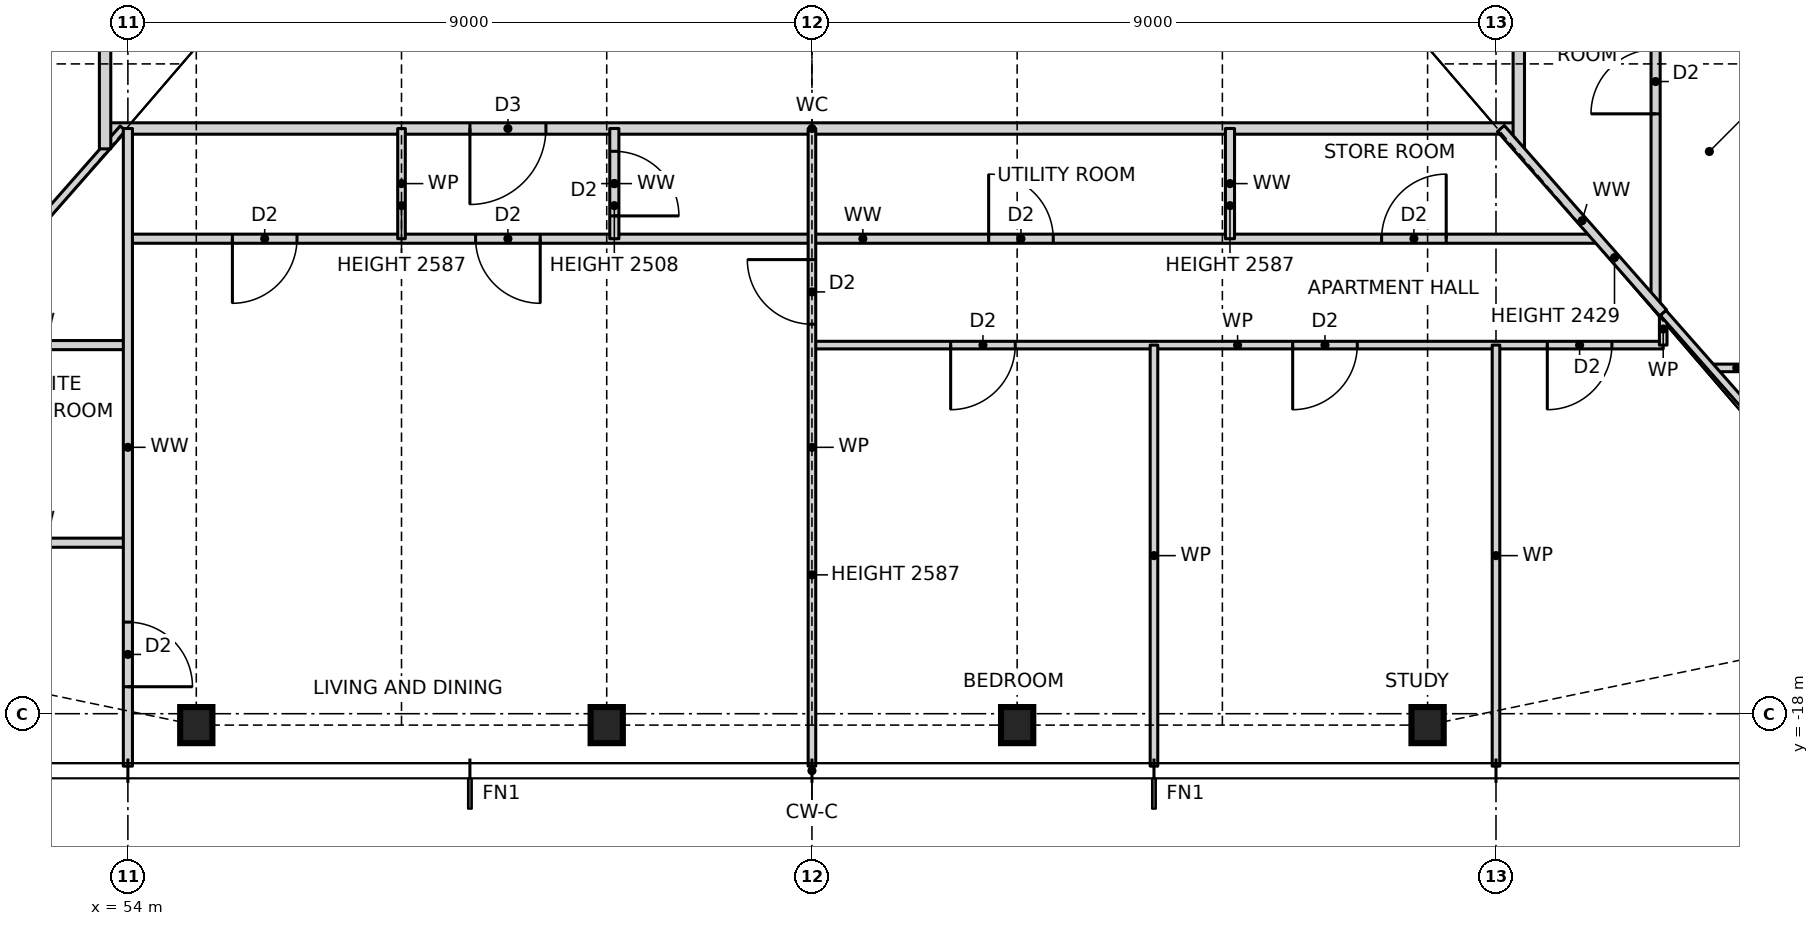
"""IFC4 building model, lengths in metres.
Left out: names, types, materials, properties, quantities, classifications, styles, units other than length and angle.
Written with IfcOpenShell. Run it as: python <this file> out.ifc"""

import sys

from ifc_helpers import new_model, si_unit, direction, frame, frame_2d, origin, origin_2d, place, context, subcontext, project, spatial, rectangle, i_section, extrude, element, fill, save


model = new_model("IFC4")
c1 = context("Model", 3, precision=1e-05, world=origin(), true_north=direction((0.0, 1.0)))
c2 = subcontext(c1, "Body", "Model", "MODEL_VIEW")
j1 = project(units=[si_unit("LENGTHUNIT", "METRE"), si_unit("PLANEANGLEUNIT", "RADIAN")], contexts=[c1])
p1 = place(None, origin())
s1 = spatial("IfcSite", under=j1, at=p1, CompositionType="ELEMENT")
p2 = place(p1, origin())
s2 = spatial("IfcBuilding", under=s1, at=p2, CompositionType="ELEMENT")
p3 = place(p2, frame((0.0, 0.0, 25.5)))
s3 = spatial("IfcBuildingStorey", under=s2, at=p3, CompositionType="ELEMENT", Elevation=25.5)
for number, where, z_axis, x_axis in (
    (1, (54.9, -18.15, 0.0), (0.0, 0.0, 1.0), (1.0, 0.0, 0.0)),
    (2, (60.3, -18.15, 0.0), (0.0, 0.0, 1.0), (1.0, 0.0, 0.0)),
    (3, (65.7, -18.15, 0.0), (0.0, 0.0, 1.0), (1.0, 0.0, 0.0)),
    (4, (71.1, -18.15, 0.0), (0.0, 0.0, 1.0), (1.0, 0.0, 0.0)),
):
    element("IfcColumn", number, at=place(p3, frame(where, z_axis=z_axis, x_axis=x_axis)), inside=s3, PredefinedType="COLUMN", context=c2, shape_type="SweptSolid", body=[
        extrude(i_section(OverallWidth=0.424, OverallDepth=0.475, WebThickness=0.048, FlangeThickness=0.077, at=origin_2d()), origin(), (0.0, 0.0, 1.0), 3.5),
    ])
p4 = place(p3, frame((51.6, -15.75, 0.0), z_axis=(0.0, 0.0, 1.0), x_axis=(1.0, 0.0, 0.0)))
e5 = element("IfcWall", 5, at=p4, inside=s3, PredefinedType="PARTITIONING", context=c2, shape_type="SweptSolid", body=[
    extrude(rectangle(XDim=2.4, YDim=0.12, at=frame_2d((1.2, 0.0))), origin(), (0.0, 0.0, 1.0), 3.27),
])
p5 = place(p3, frame((74.836, -13.45, 0.0), z_axis=(0.0, 0.0, 1.0), x_axis=(1.0, 0.0, 0.0)))
e6 = element("IfcWall", 6, at=p5, inside=s3, PredefinedType="PARTITIONING", context=c2, shape_type="SweptSolid", body=[
    extrude(rectangle(XDim=0.664, YDim=0.1, at=frame_2d((0.332, 0.0))), origin(), (0.0, 0.0, 1.0), 3.27),
])
p6 = place(p3, frame((51.6, -13.15, 0.0), z_axis=(0.0, 0.0, 1.0), x_axis=(1.0, 0.0, 0.0)))
e7 = element("IfcWall", 7, at=p6, inside=s3, PredefinedType="PARTITIONING", context=c2, shape_type="SweptSolid", body=[
    extrude(rectangle(XDim=2.4, YDim=0.12, at=frame_2d((1.2, 0.0))), origin(), (0.0, 0.0, 1.0), 3.27),
])
p7 = place(p3, frame((63.0, -13.15, 0.0), z_axis=(0.0, 0.0, 1.0), x_axis=(1.0, 0.0, 0.0)))
e8 = element("IfcWall", 8, at=p7, inside=s3, PredefinedType="PARTITIONING", context=c2, shape_type="SweptSolid", body=[
    extrude(rectangle(XDim=11.2, YDim=0.1, at=frame_2d((5.6, 0.0))), origin(), (0.0, 0.0, 1.0), 3.27),
])
p8 = place(p7, frame((1.825, 0.0, 0.0)))
e9 = element("IfcOpeningElement", 9, at=p8, cuts=e8, PredefinedType="OPENING", context=c2, shape_type="SweptSolid", body=[
    extrude(rectangle(XDim=0.85, YDim=2.1, at=frame_2d((0.425, 1.05))), frame((0.0, 0.06, 0.0), z_axis=(0.0, -1.0, 0.0), x_axis=(1.0, 0.0, 0.0)), (0.0, 0.0, 1.0), 0.12),
])
p9 = place(p7, frame((6.325, 0.0, 0.0)))
e10 = element("IfcOpeningElement", 10, at=p9, cuts=e8, PredefinedType="OPENING", context=c2, shape_type="SweptSolid", body=[
    extrude(rectangle(XDim=0.85, YDim=2.1, at=frame_2d((0.425, 1.05))), frame((0.0, 0.06, 0.0), z_axis=(0.0, -1.0, 0.0), x_axis=(1.0, 0.0, 0.0)), (0.0, 0.0, 1.0), 0.12),
])
p10 = place(p7, frame((9.675, 0.0, 0.0)))
e11 = element("IfcOpeningElement", 11, at=p10, cuts=e8, PredefinedType="OPENING", context=c2, shape_type="SweptSolid", body=[
    extrude(rectangle(XDim=0.85, YDim=2.1, at=frame_2d((0.425, 1.05))), frame((0.0, 0.06, 0.0), z_axis=(0.0, -1.0, 0.0), x_axis=(1.0, 0.0, 0.0)), (0.0, 0.0, 1.0), 0.12),
])
p11 = place(p3, frame((54.0, -11.75, 0.0), z_axis=(0.0, 0.0, 1.0), x_axis=(1.0, 0.0, 0.0)))
e12 = element("IfcWall", 12, at=p11, inside=s3, PredefinedType="PARTITIONING", context=c2, shape_type="SweptSolid", body=[
    extrude(rectangle(XDim=19.34, YDim=0.12, at=frame_2d((9.67, 0.0))), origin(), (0.0, 0.0, 1.0), 3.27),
])
p12 = place(p11, frame((1.375, 0.0, 0.0)))
e13 = element("IfcOpeningElement", 13, at=p12, cuts=e12, PredefinedType="OPENING", context=c2, shape_type="SweptSolid", body=[
    extrude(rectangle(XDim=0.85, YDim=2.1, at=frame_2d((0.425, 1.05))), frame((0.0, 0.07, 0.0), z_axis=(0.0, -1.0, 0.0), x_axis=(1.0, 0.0, 0.0)), (0.0, 0.0, 1.0), 0.14),
])
p13 = place(p11, frame((4.575, 0.0, 0.0)))
e14 = element("IfcOpeningElement", 14, at=p13, cuts=e12, PredefinedType="OPENING", context=c2, shape_type="SweptSolid", body=[
    extrude(rectangle(XDim=0.85, YDim=2.1, at=frame_2d((0.425, 1.05))), frame((0.0, 0.07, 0.0), z_axis=(0.0, -1.0, 0.0), x_axis=(1.0, 0.0, 0.0)), (0.0, 0.0, 1.0), 0.14),
])
p14 = place(p11, frame((11.325, 0.0, 0.0)))
e15 = element("IfcOpeningElement", 15, at=p14, cuts=e12, PredefinedType="OPENING", context=c2, shape_type="SweptSolid", body=[
    extrude(rectangle(XDim=0.85, YDim=2.1, at=frame_2d((0.425, 1.05))), frame((0.0, 0.07, 0.0), z_axis=(0.0, -1.0, 0.0), x_axis=(1.0, 0.0, 0.0)), (0.0, 0.0, 1.0), 0.14),
])
p15 = place(p11, frame((16.495, 0.0, 0.0)))
e16 = element("IfcOpeningElement", 16, at=p15, cuts=e12, PredefinedType="OPENING", context=c2, shape_type="SweptSolid", body=[
    extrude(rectangle(XDim=0.85, YDim=2.1, at=frame_2d((0.425, 1.05))), frame((0.0, 0.07, 0.0), z_axis=(0.0, -1.0, 0.0), x_axis=(1.0, 0.0, 0.0)), (0.0, 0.0, 1.0), 0.14),
])
p16 = place(p3, frame((53.7, -10.3, 0.0), z_axis=(0.0, 0.0, 1.0), x_axis=(1.0, 0.0, 0.0)))
e17 = element("IfcWall", 17, at=p16, inside=s3, PredefinedType="PARTITIONING", context=c2, shape_type="SweptSolid", body=[
    extrude(rectangle(XDim=18.6, YDim=0.15, at=frame_2d((9.3, 0.0))), origin(), (0.0, 0.0, 1.0), 3.27),
])
p17 = place(p16, frame((4.8, 0.0, 0.0)))
e18 = element("IfcOpeningElement", 18, at=p17, cuts=e17, PredefinedType="OPENING", context=c2, shape_type="SweptSolid", body=[
    extrude(rectangle(XDim=1.0, YDim=2.1, at=frame_2d((0.5, 1.05))), frame((0.0, 0.085, 0.0), z_axis=(0.0, -1.0, 0.0), x_axis=(1.0, 0.0, 0.0)), (0.0, 0.0, 1.0), 0.17),
])
p18 = place(p3, frame((47.944, -17.109, 0.0), z_axis=(0.0, 0.0, 1.0), x_axis=(0.660638210404, 0.750704439146, 0.0)))
e19 = element("IfcWall", 19, at=p18, inside=s3, PredefinedType="PARTITIONING", context=c2, shape_type="SweptSolid", body=[
    extrude(rectangle(XDim=9.07, YDim=0.1, at=frame_2d((4.535, 0.0))), origin(), (0.0, 0.0, 1.0), 2.429),
])
p19 = place(p3, frame((74.2, -13.15, 0.0), z_axis=(0.0, 0.0, 1.0), x_axis=(0.0, 1.0, 0.0)))
e20 = element("IfcWall", 20, at=p19, inside=s3, PredefinedType="PARTITIONING", context=c2, shape_type="SweptSolid", body=[
    extrude(rectangle(XDim=0.423, YDim=0.1, at=frame_2d((0.211, 0.0))), origin(), (0.0, 0.0, 1.0), 3.27),
])
p20 = place(p3, frame((74.1, -12.614, 0.0), z_axis=(0.0, 0.0, 1.0), x_axis=(0.0, 1.0, 0.0)))
e21 = element("IfcWall", 21, at=p20, inside=s3, PredefinedType="PARTITIONING", context=c2, shape_type="SweptSolid", body=[
    extrude(rectangle(XDim=25.228, YDim=0.12, at=frame_2d((12.614, 0.0))), origin(), (0.0, 0.0, 1.0), 3.27),
])
p21 = place(p20, frame((7.239, 0.0, 0.0)))
e22 = element("IfcOpeningElement", 22, at=p21, cuts=e21, PredefinedType="OPENING", context=c2, shape_type="SweptSolid", body=[
    extrude(rectangle(XDim=0.85, YDim=2.1, at=frame_2d((0.425, 1.05))), frame((0.0, 0.07, 0.0), z_axis=(0.0, -1.0, 0.0), x_axis=(1.0, 0.0, 0.0)), (0.0, 0.0, 1.0), 0.14),
])
p22 = place(p20, frame((10.439, 0.0, 0.0)))
e23 = element("IfcOpeningElement", 23, at=p22, cuts=e21, PredefinedType="OPENING", context=c2, shape_type="SweptSolid", body=[
    extrude(rectangle(XDim=0.85, YDim=2.1, at=frame_2d((0.425, 1.05))), frame((0.0, 0.07, 0.0), z_axis=(0.0, -1.0, 0.0), x_axis=(1.0, 0.0, 0.0)), (0.0, 0.0, 1.0), 0.14),
])
p23 = place(p20, frame((2.507, 0.0, 0.0)))
e24 = element("IfcOpeningElement", 24, at=p23, cuts=e21, PredefinedType="OPENING", context=c2, shape_type="SweptSolid", body=[
    extrude(rectangle(XDim=0.85, YDim=2.1, at=frame_2d((0.425, 1.05))), frame((0.0, 0.07, 0.0), z_axis=(0.0, -1.0, 0.0), x_axis=(1.0, 0.0, 0.0)), (0.0, 0.0, 1.0), 0.14),
])
p24 = place(p20, frame((16.639, 0.0, 0.0)))
e25 = element("IfcOpeningElement", 25, at=p24, cuts=e21, PredefinedType="OPENING", context=c2, shape_type="SweptSolid", body=[
    extrude(rectangle(XDim=0.85, YDim=2.1, at=frame_2d((0.425, 1.05))), frame((0.0, 0.07, 0.0), z_axis=(0.0, -1.0, 0.0), x_axis=(1.0, 0.0, 0.0)), (0.0, 0.0, 1.0), 0.14),
])
p25 = place(p20, frame((21.821, 0.0, 0.0)))
e26 = element("IfcOpeningElement", 26, at=p25, cuts=e21, PredefinedType="OPENING", context=c2, shape_type="SweptSolid", body=[
    extrude(rectangle(XDim=0.85, YDim=2.1, at=frame_2d((0.425, 1.05))), frame((0.0, 0.07, 0.0), z_axis=(0.0, -1.0, 0.0), x_axis=(1.0, 0.0, 0.0)), (0.0, 0.0, 1.0), 0.14),
])
p26 = place(p3, frame((72.3, -10.568, 0.0), z_axis=(0.0, 0.0, 1.0), x_axis=(0.0, 1.0, 0.0)))
e27 = element("IfcWall", 27, at=p26, inside=s3, PredefinedType="PARTITIONING", context=c2, shape_type="SweptSolid", body=[
    extrude(rectangle(XDim=21.136, YDim=0.15, at=frame_2d((10.568, 0.0))), origin(), (0.0, 0.0, 1.0), 3.27),
])
p27 = place(p26, frame((8.318, 0.0, 0.0)))
e28 = element("IfcOpeningElement", 28, at=p27, cuts=e27, PredefinedType="OPENING", context=c2, shape_type="SweptSolid", body=[
    extrude(rectangle(XDim=1.0, YDim=2.1, at=frame_2d((0.5, 1.05))), frame((0.0, 0.085, 0.0), z_axis=(0.0, -1.0, 0.0), x_axis=(1.0, 0.0, 0.0)), (0.0, 0.0, 1.0), 0.17),
])
p28 = place(p3, frame((72.0, -18.69, 0.0), z_axis=(0.0, 0.0, 1.0), x_axis=(0.0, 1.0, 0.0)))
e29 = element("IfcWall", 29, at=p28, inside=s3, PredefinedType="PARTITIONING", context=c2, shape_type="SweptSolid", body=[
    extrude(rectangle(XDim=5.54, YDim=0.1, at=frame_2d((2.77, 0.0))), origin(), (0.0, 0.0, 1.0), 3.27),
])
p29 = place(p3, frame((68.5, -11.75, 0.0), z_axis=(0.0, 0.0, 1.0), x_axis=(0.0, 1.0, 0.0)))
e30 = element("IfcWall", 30, at=p29, inside=s3, PredefinedType="PARTITIONING", context=c2, shape_type="SweptSolid", body=[
    extrude(rectangle(XDim=1.45, YDim=0.12, at=frame_2d((0.725, 0.0))), origin(), (0.0, 0.0, 1.0), 2.587),
])
p30 = place(p3, frame((67.5, -18.69, 0.0), z_axis=(0.0, 0.0, 1.0), x_axis=(0.0, 1.0, 0.0)))
e31 = element("IfcWall", 31, at=p30, inside=s3, PredefinedType="PARTITIONING", context=c2, shape_type="SweptSolid", body=[
    extrude(rectangle(XDim=5.54, YDim=0.1, at=frame_2d((2.77, 0.0))), origin(), (0.0, 0.0, 1.0), 3.27),
])
p31 = place(p3, frame((63.0, -18.69, 0.0), z_axis=(0.0, 0.0, 1.0), x_axis=(0.0, 1.0, 0.0)))
e32 = element("IfcWall", 32, at=p31, inside=s3, PredefinedType="PARTITIONING", context=c2, shape_type="SweptSolid", body=[
    extrude(rectangle(XDim=8.39, YDim=0.1, at=frame_2d((4.195, 0.0))), origin(), (0.0, 0.0, 1.0), 2.587),
])
p32 = place(p31, frame((5.815, 0.0, 0.0)))
e33 = element("IfcOpeningElement", 33, at=p32, cuts=e32, PredefinedType="OPENING", context=c2, shape_type="SweptSolid", body=[
    extrude(rectangle(XDim=0.85, YDim=2.1, at=frame_2d((0.425, 1.05))), frame((0.0, 0.06, 0.0), z_axis=(0.0, -1.0, 0.0), x_axis=(1.0, 0.0, 0.0)), (0.0, 0.0, 1.0), 0.12),
])
p33 = place(p3, frame((60.4, -11.75, 0.0), z_axis=(0.0, 0.0, 1.0), x_axis=(0.0, 1.0, 0.0)))
e34 = element("IfcWall", 34, at=p33, inside=s3, PredefinedType="PARTITIONING", context=c2, shape_type="SweptSolid", body=[
    extrude(rectangle(XDim=1.45, YDim=0.12, at=frame_2d((0.725, 0.0))), origin(), (0.0, 0.0, 1.0), 2.508),
])
p34 = place(p33, frame((0.3, 0.0, 0.0)))
e35 = element("IfcOpeningElement", 35, at=p34, cuts=e34, PredefinedType="OPENING", context=c2, shape_type="SweptSolid", body=[
    extrude(rectangle(XDim=0.85, YDim=2.1, at=frame_2d((0.425, 1.05))), frame((0.0, 0.07, 0.0), z_axis=(0.0, -1.0, 0.0), x_axis=(1.0, 0.0, 0.0)), (0.0, 0.0, 1.0), 0.14),
])
p35 = place(p3, frame((57.6, -11.75, 0.0), z_axis=(0.0, 0.0, 1.0), x_axis=(0.0, 1.0, 0.0)))
e36 = element("IfcWall", 36, at=p35, inside=s3, PredefinedType="PARTITIONING", context=c2, shape_type="SweptSolid", body=[
    extrude(rectangle(XDim=1.45, YDim=0.1, at=frame_2d((0.725, 0.0))), origin(), (0.0, 0.0, 1.0), 2.587),
])
p36 = place(p3, frame((54.0, -18.69, 0.0), z_axis=(0.0, 0.0, 1.0), x_axis=(0.0, 1.0, 0.0)))
e37 = element("IfcWall", 37, at=p36, inside=s3, PredefinedType="PARTITIONING", context=c2, shape_type="SweptSolid", body=[
    extrude(rectangle(XDim=8.39, YDim=0.12, at=frame_2d((4.195, 0.0))), origin(), (0.0, 0.0, 1.0), 3.27),
])
p37 = place(p36, frame((1.045, 0.0, 0.0)))
e38 = element("IfcOpeningElement", 38, at=p37, cuts=e37, PredefinedType="OPENING", context=c2, shape_type="SweptSolid", body=[
    extrude(rectangle(XDim=0.85, YDim=2.1, at=frame_2d((0.425, 1.05))), frame((0.0, 0.07, 0.0), z_axis=(0.0, -1.0, 0.0), x_axis=(1.0, 0.0, 0.0)), (0.0, 0.0, 1.0), 0.14),
])
p38 = place(p3, frame((53.7, -10.568, 0.0), z_axis=(0.0, 0.0, 1.0), x_axis=(0.0, 1.0, 0.0)))
e39 = element("IfcWall", 39, at=p38, inside=s3, PredefinedType="PARTITIONING", context=c2, shape_type="SweptSolid", body=[
    extrude(rectangle(XDim=21.136, YDim=0.15, at=frame_2d((10.568, 0.0))), origin(), (0.0, 0.0, 1.0), 3.27),
])
p39 = place(p38, frame((11.818, 0.0, 0.0)))
e40 = element("IfcOpeningElement", 40, at=p39, cuts=e39, PredefinedType="OPENING", context=c2, shape_type="SweptSolid", body=[
    extrude(rectangle(XDim=1.0, YDim=2.1, at=frame_2d((0.5, 1.05))), frame((0.0, 0.085, 0.0), z_axis=(0.0, -1.0, 0.0), x_axis=(1.0, 0.0, 0.0)), (0.0, 0.0, 1.0), 0.17),
])
p40 = place(p3, frame((74.2, -12.727, 0.0), z_axis=(0.0, 0.0, 1.0), x_axis=(-0.660667046586, 0.75067906162, 0.0)))
e41 = element("IfcWall", 41, at=p40, inside=s3, PredefinedType="PARTITIONING", context=c2, shape_type="SweptSolid", body=[
    extrude(rectangle(XDim=3.233, YDim=0.12, at=frame_2d((1.617, 0.0))), origin(), (0.0, 0.0, 1.0), 2.429),
])
p41 = place(p3, frame((78.057, -17.109, 0.0), z_axis=(0.0, 0.0, 1.0), x_axis=(-0.660698595885, 0.750651294141, 0.0)))
e42 = element("IfcWall", 42, at=p41, inside=s3, PredefinedType="PARTITIONING", context=c2, shape_type="SweptSolid", body=[
    extrude(rectangle(XDim=5.838, YDim=0.1, at=frame_2d((2.919, 0.0))), origin(), (0.0, 0.0, 1.0), 2.429),
])
p42 = place(p12, frame((0.85, 0.0, 0.0), z_axis=(0.0, 0.0, 1.0), x_axis=(-1.0, 0.0, 0.0)))
e43 = element("IfcDoor", 43, at=p42, inside=s3, OperationType="SINGLE_SWING_RIGHT", PredefinedType="DOOR", context=c2, shape_type="SweptSolid", body=[
    extrude(rectangle(XDim=0.85, YDim=2.1, at=frame_2d((0.425, 1.05))), frame((0.0, 0.025, 0.0), z_axis=(0.0, -1.0, 0.0), x_axis=(1.0, 0.0, 0.0)), (0.0, 0.0, 1.0), 0.05),
])
fill(e13, e43)
p43 = place(p17, frame((1.0, 0.0, 0.0), z_axis=(0.0, 0.0, 1.0), x_axis=(-1.0, 0.0, 0.0)))
e44 = element("IfcDoor", 44, at=p43, inside=s3, OperationType="SINGLE_SWING_RIGHT", PredefinedType="DOOR", context=c2, shape_type="SweptSolid", body=[
    extrude(rectangle(XDim=1.0, YDim=2.1, at=frame_2d((0.5, 1.05))), frame((0.0, 0.025, 0.0), z_axis=(0.0, -1.0, 0.0), x_axis=(1.0, 0.0, 0.0)), (0.0, 0.0, 1.0), 0.05),
])
fill(e18, e44)
p44 = place(p13, frame((0.85, 0.0, 0.0), z_axis=(0.0, 0.0, 1.0), x_axis=(-1.0, 0.0, 0.0)))
e45 = element("IfcDoor", 45, at=p44, inside=s3, OperationType="SINGLE_SWING_LEFT", PredefinedType="DOOR", context=c2, shape_type="SweptSolid", body=[
    extrude(rectangle(XDim=0.85, YDim=2.1, at=frame_2d((0.425, 1.05))), frame((0.0, 0.025, 0.0), z_axis=(0.0, -1.0, 0.0), x_axis=(1.0, 0.0, 0.0)), (0.0, 0.0, 1.0), 0.05),
])
fill(e14, e45)
p45 = place(p34, frame((0.85, 0.0, 0.0), z_axis=(0.0, 0.0, 1.0), x_axis=(-1.0, 0.0, 0.0)))
e46 = element("IfcDoor", 46, at=p45, inside=s3, OperationType="SINGLE_SWING_RIGHT", PredefinedType="DOOR", context=c2, shape_type="SweptSolid", body=[
    extrude(rectangle(XDim=0.85, YDim=2.1, at=frame_2d((0.425, 1.05))), frame((0.0, 0.025, 0.0), z_axis=(0.0, -1.0, 0.0), x_axis=(1.0, 0.0, 0.0)), (0.0, 0.0, 1.0), 0.05),
])
fill(e35, e46)
p46 = place(p37, frame((0.85, 0.0, 0.0), z_axis=(0.0, 0.0, 1.0), x_axis=(-1.0, 0.0, 0.0)))
e47 = element("IfcDoor", 47, at=p46, inside=s3, OperationType="SINGLE_SWING_RIGHT", PredefinedType="DOOR", context=c2, shape_type="SweptSolid", body=[
    extrude(rectangle(XDim=0.85, YDim=2.1, at=frame_2d((0.425, 1.05))), frame((0.0, 0.025, 0.0), z_axis=(0.0, -1.0, 0.0), x_axis=(1.0, 0.0, 0.0)), (0.0, 0.0, 1.0), 0.05),
])
fill(e38, e47)
p47 = place(p32, origin())
e48 = element("IfcDoor", 48, at=p47, inside=s3, OperationType="SINGLE_SWING_RIGHT", PredefinedType="DOOR", context=c2, shape_type="SweptSolid", body=[
    extrude(rectangle(XDim=0.85, YDim=2.1, at=frame_2d((0.425, 1.05))), frame((0.0, 0.025, 0.0), z_axis=(0.0, -1.0, 0.0), x_axis=(1.0, 0.0, 0.0)), (0.0, 0.0, 1.0), 0.05),
])
fill(e33, e48)
p48 = place(p8, frame((0.85, 0.0, 0.0), z_axis=(0.0, 0.0, 1.0), x_axis=(-1.0, 0.0, 0.0)))
e49 = element("IfcDoor", 49, at=p48, inside=s3, OperationType="SINGLE_SWING_RIGHT", PredefinedType="DOOR", context=c2, shape_type="SweptSolid", body=[
    extrude(rectangle(XDim=0.85, YDim=2.1, at=frame_2d((0.425, 1.05))), frame((0.0, 0.025, 0.0), z_axis=(0.0, -1.0, 0.0), x_axis=(1.0, 0.0, 0.0)), (0.0, 0.0, 1.0), 0.05),
])
fill(e9, e49)
p49 = place(p9, frame((0.85, 0.0, 0.0), z_axis=(0.0, 0.0, 1.0), x_axis=(-1.0, 0.0, 0.0)))
e50 = element("IfcDoor", 50, at=p49, inside=s3, OperationType="SINGLE_SWING_RIGHT", PredefinedType="DOOR", context=c2, shape_type="SweptSolid", body=[
    extrude(rectangle(XDim=0.85, YDim=2.1, at=frame_2d((0.425, 1.05))), frame((0.0, 0.025, 0.0), z_axis=(0.0, -1.0, 0.0), x_axis=(1.0, 0.0, 0.0)), (0.0, 0.0, 1.0), 0.05),
])
fill(e10, e50)
p50 = place(p10, frame((0.85, 0.0, 0.0), z_axis=(0.0, 0.0, 1.0), x_axis=(-1.0, 0.0, 0.0)))
e51 = element("IfcDoor", 51, at=p50, inside=s3, OperationType="SINGLE_SWING_RIGHT", PredefinedType="DOOR", context=c2, shape_type="SweptSolid", body=[
    extrude(rectangle(XDim=0.85, YDim=2.1, at=frame_2d((0.425, 1.05))), frame((0.0, 0.025, 0.0), z_axis=(0.0, -1.0, 0.0), x_axis=(1.0, 0.0, 0.0)), (0.0, 0.0, 1.0), 0.05),
])
fill(e11, e51)
p51 = place(p14, origin())
e52 = element("IfcDoor", 52, at=p51, inside=s3, OperationType="SINGLE_SWING_LEFT", PredefinedType="DOOR", context=c2, shape_type="SweptSolid", body=[
    extrude(rectangle(XDim=0.85, YDim=2.1, at=frame_2d((0.425, 1.05))), frame((0.0, 0.025, 0.0), z_axis=(0.0, -1.0, 0.0), x_axis=(1.0, 0.0, 0.0)), (0.0, 0.0, 1.0), 0.05),
])
fill(e15, e52)
p52 = place(p15, origin())
e53 = element("IfcDoor", 53, at=p52, inside=s3, OperationType="SINGLE_SWING_RIGHT", PredefinedType="DOOR", context=c2, shape_type="SweptSolid", body=[
    extrude(rectangle(XDim=0.85, YDim=2.1, at=frame_2d((0.425, 1.05))), frame((0.0, 0.025, 0.0), z_axis=(0.0, -1.0, 0.0), x_axis=(1.0, 0.0, 0.0)), (0.0, 0.0, 1.0), 0.05),
])
fill(e16, e53)
p53 = place(p23, origin())
e54 = element("IfcDoor", 54, at=p53, inside=s3, OperationType="SINGLE_SWING_LEFT", PredefinedType="DOOR", context=c2, shape_type="SweptSolid", body=[
    extrude(rectangle(XDim=0.85, YDim=2.1, at=frame_2d((0.425, 1.05))), frame((0.0, 0.025, 0.0), z_axis=(0.0, -1.0, 0.0), x_axis=(1.0, 0.0, 0.0)), (0.0, 0.0, 1.0), 0.05),
])
fill(e24, e54)
save(model, sys.argv[1])
